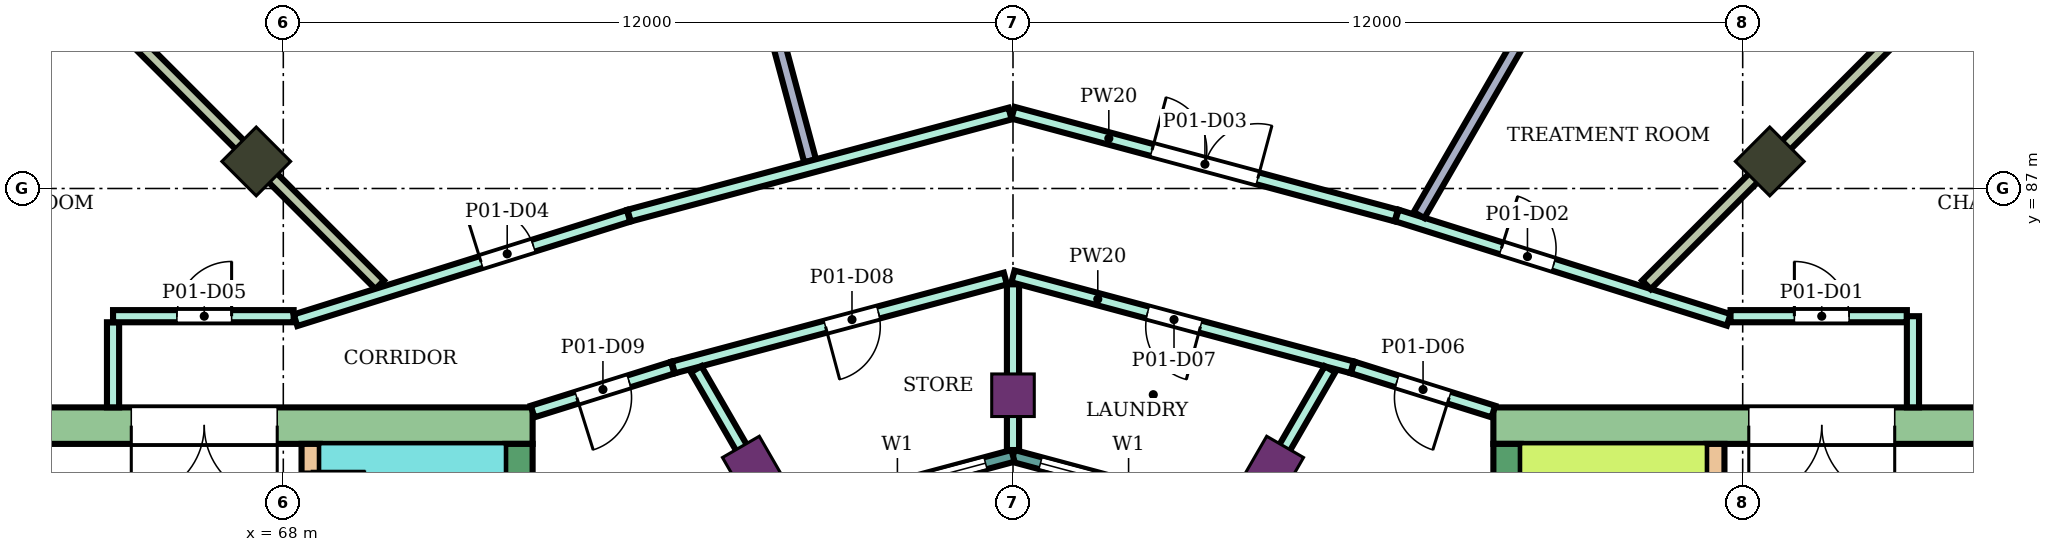
"""IFC4 building model, lengths in metres.
Left out: names, types, materials, properties, quantities, classifications, styles, units other than length and angle.
Written with IfcOpenShell. Run it as: python <this file> out.ifc"""

import sys

from ifc_helpers import new_model, si_unit, direction, frame, frame_2d, origin, origin_2d, place, context, subcontext, project, spatial, rectangle, extrude, element, fill, save


model = new_model("IFC4")
c1 = context("Model", 3, precision=1e-05, world=origin(), true_north=direction((0.0, 1.0)))
c2 = subcontext(c1, "Body", "Model", "MODEL_VIEW")
j1 = project(units=[si_unit("LENGTHUNIT", "METRE"), si_unit("PLANEANGLEUNIT", "RADIAN")], contexts=[c1])
p1 = place(None, origin())
s1 = spatial("IfcSite", under=j1, at=p1, CompositionType="ELEMENT")
p2 = place(p1, origin())
s2 = spatial("IfcBuilding", under=s1, at=p2, CompositionType="ELEMENT")
p3 = place(p2, frame((0.0, 0.0, 270.9)))
s3 = spatial("IfcBuildingStorey", under=s2, at=p3, CompositionType="ELEMENT", Elevation=270.9)
for number, where, z_axis, x_axis in (
    (1, (92.445, 87.445, 0.0), (0.0, 0.0, 1.0), (0.707, 0.707, 0.0)),
    (2, (67.555, 87.445, 0.0), (0.0, 0.0, 1.0), (-0.707, 0.707, 0.0)),
):
    element("IfcColumn", number, at=place(p3, frame(where, z_axis=z_axis, x_axis=x_axis)), inside=s3, PredefinedType="COLUMN", context=c2, shape_type="SweptSolid", body=[
        extrude(rectangle(XDim=0.8, YDim=0.8, at=origin_2d()), origin(), (0.0, 0.0, 1.0), 4.8),
    ])
for number, where, z_axis, x_axis in (
    (3, (84.3, 82.448, 0.0), (0.0, 0.0, 1.0), (0.5, 0.866, 0.0)),
    (4, (80.0, 83.6, 0.0), (0.0, 0.0, 1.0), (0.0, 1.0, 0.0)),
    (5, (75.7, 82.448, 0.0), (0.0, 0.0, 1.0), (-0.5, 0.866, 0.0)),
):
    element("IfcColumn", number, at=place(p3, frame(where, z_axis=z_axis, x_axis=x_axis)), inside=s3, PredefinedType="COLUMN", context=c2, shape_type="SweptSolid", body=[
        extrude(rectangle(XDim=0.7, YDim=0.7, at=origin_2d()), origin(), (0.0, 0.0, 1.0), 4.8),
    ])
p4 = place(p3, frame((87.9, 83.1, 0.0), z_axis=(0.0, 0.0, 1.0), x_axis=(1.0, 0.0, 0.0)))
e6 = element("IfcWall", 6, at=p4, inside=s3, PredefinedType="SHEAR", context=c2, shape_type="SweptSolid", body=[
    extrude(rectangle(XDim=14.9, YDim=0.6, at=frame_2d((7.45, 0.0))), origin(), (0.0, 0.0, 1.0), 4.48),
])
p5 = place(p4, frame((4.2, 0.0, 0.0)))
e7 = element("IfcOpeningElement", 7, at=p5, cuts=e6, PredefinedType="OPENING", context=c2, shape_type="SweptSolid", body=[
    extrude(rectangle(XDim=2.4, YDim=2.4, at=frame_2d((1.2, 1.2))), frame((0.0, 0.31, 0.0), z_axis=(0.0, -1.0, 0.0), x_axis=(1.0, 0.0, 0.0)), (0.0, 0.0, 1.0), 0.62),
])
p6 = place(p3, frame((88.125, 75.0, 0.0), z_axis=(0.0, 0.0, 1.0), x_axis=(0.0, 1.0, 0.0)))
e8 = element("IfcWall", 8, at=p6, inside=s3, PredefinedType="SHEAR", context=c2, shape_type="SweptSolid", body=[
    extrude(rectangle(XDim=7.8, YDim=0.45, at=frame_2d((3.9, 0.0))), origin(), (0.0, 0.0, 1.0), 4.48),
])
p7 = place(p3, frame((91.55, 75.0, 0.0), z_axis=(0.0, 0.0, 1.0), x_axis=(0.0, 1.0, 0.0)))
e9 = element("IfcWall", 9, at=p7, inside=s3, PredefinedType="SHEAR", context=c2, shape_type="SweptSolid", body=[
    extrude(rectangle(XDim=7.8, YDim=0.3, at=frame_2d((3.9, 0.0))), origin(), (0.0, 0.0, 1.0), 4.48),
])
p8 = place(p7, frame((1.85, 0.0, 0.0)))
e10 = element("IfcOpeningElement", 10, at=p8, cuts=e9, PredefinedType="OPENING", context=c2, shape_type="SweptSolid", body=[
    extrude(rectangle(XDim=0.9, YDim=2.1, at=frame_2d((0.45, 1.05))), frame((0.0, 0.16, 0.0), z_axis=(0.0, -1.0, 0.0), x_axis=(1.0, 0.0, 0.0)), (0.0, 0.0, 1.0), 0.32),
])
p9 = place(p3, frame((72.1, 83.1, 0.0), z_axis=(0.0, 0.0, 1.0), x_axis=(-1.0, 0.0, 0.0)))
e11 = element("IfcWall", 11, at=p9, inside=s3, PredefinedType="SHEAR", context=c2, shape_type="SweptSolid", body=[
    extrude(rectangle(XDim=14.9, YDim=0.6, at=frame_2d((7.45, 0.0))), origin(), (0.0, 0.0, 1.0), 4.48),
])
p10 = place(p9, frame((4.2, 0.0, 0.0)))
e12 = element("IfcOpeningElement", 12, at=p10, cuts=e11, PredefinedType="OPENING", context=c2, shape_type="SweptSolid", body=[
    extrude(rectangle(XDim=2.4, YDim=2.4, at=frame_2d((1.2, 1.2))), frame((0.0, 0.31, 0.0), z_axis=(0.0, -1.0, 0.0), x_axis=(1.0, 0.0, 0.0)), (0.0, 0.0, 1.0), 0.62),
])
p11 = place(p3, frame((71.875, 82.8, 0.0), z_axis=(0.0, 0.0, 1.0), x_axis=(0.0, -1.0, 0.0)))
e13 = element("IfcWall", 13, at=p11, inside=s3, PredefinedType="SHEAR", context=c2, shape_type="SweptSolid", body=[
    extrude(rectangle(XDim=7.8, YDim=0.45, at=frame_2d((3.9, 0.0))), origin(), (0.0, 0.0, 1.0), 4.48),
])
p12 = place(p3, frame((68.45, 82.8, 0.0), z_axis=(0.0, 0.0, 1.0), x_axis=(0.0, -1.0, 0.0)))
e14 = element("IfcWall", 14, at=p12, inside=s3, PredefinedType="SHEAR", context=c2, shape_type="SweptSolid", body=[
    extrude(rectangle(XDim=7.8, YDim=0.3, at=frame_2d((3.9, 0.0))), origin(), (0.0, 0.0, 1.0), 4.48),
])
p13 = place(p12, frame((0.45, 0.0, 0.0)))
e15 = element("IfcOpeningElement", 15, at=p13, cuts=e14, PredefinedType="OPENING", context=c2, shape_type="SweptSolid", body=[
    extrude(rectangle(XDim=0.9, YDim=2.1, at=frame_2d((0.45, 1.05))), frame((0.0, 0.16, 0.0), z_axis=(0.0, -1.0, 0.0), x_axis=(1.0, 0.0, 0.0)), (0.0, 0.0, 1.0), 0.32),
])
p14 = place(p3, frame((83.802, 81.585, 0.0), z_axis=(0.0, 0.0, 1.0), x_axis=(-0.965933654434, 0.258789828301, 0.0)))
e16 = element("IfcWall", 16, at=p14, inside=s3, PredefinedType="NOTDEFINED", context=c2, shape_type="SweptSolid", body=[
    extrude(rectangle(XDim=3.936, YDim=0.2, at=frame_2d((1.968, 0.0))), origin(), (0.0, 0.0, 1.0), 4.8),
])
p15 = place(p14, frame((0.468, 0.0, 0.9)))
e17 = element("IfcOpeningElement", 17, at=p15, cuts=e16, PredefinedType="OPENING", context=c2, shape_type="SweptSolid", body=[
    extrude(rectangle(XDim=3.0, YDim=2.3, at=frame_2d((1.5, 1.15))), frame((0.0, 0.11, 0.0), z_axis=(0.0, -1.0, 0.0), x_axis=(1.0, 0.0, 0.0)), (0.0, 0.0, 1.0), 0.22),
])
p16 = place(p3, frame((80.0, 82.604, 0.0), z_axis=(0.0, 0.0, 1.0), x_axis=(-0.965933654434, -0.258789828301, 0.0)))
e18 = element("IfcWall", 18, at=p16, inside=s3, PredefinedType="NOTDEFINED", context=c2, shape_type="SweptSolid", body=[
    extrude(rectangle(XDim=3.936, YDim=0.2, at=frame_2d((1.968, 0.0))), origin(), (0.0, 0.0, 1.0), 4.8),
])
p17 = place(p16, frame((0.468, 0.0, 0.9)))
e19 = element("IfcOpeningElement", 19, at=p17, cuts=e18, PredefinedType="OPENING", context=c2, shape_type="SweptSolid", body=[
    extrude(rectangle(XDim=3.0, YDim=2.3, at=frame_2d((1.5, 1.15))), frame((0.0, 0.11, 0.0), z_axis=(0.0, -1.0, 0.0), x_axis=(1.0, 0.0, 0.0)), (0.0, 0.0, 1.0), 0.22),
])
p18 = place(p3, frame((63.597, 91.406, 0.0), z_axis=(0.0, 0.0, 1.0), x_axis=(0.707034710536, -0.707178844492, 0.0)))
e20 = element("IfcWall", 20, at=p18, inside=s3, PredefinedType="PARTITIONING", context=c2, shape_type="SweptSolid", body=[
    extrude(rectangle(XDim=8.469, YDim=0.2, at=frame_2d((4.235, 0.0))), origin(), (0.0, 0.0, 1.0), 3.08),
])
p19 = place(p3, frame((65.2, 83.401, 0.0), z_axis=(0.0, 0.0, 1.0), x_axis=(0.0, 1.0, 0.0)))
e21 = element("IfcWall", 21, at=p19, inside=s3, PredefinedType="PARTITIONING", context=c2, shape_type="SweptSolid", body=[
    extrude(rectangle(XDim=1.399, YDim=0.2, at=frame_2d((0.7, 0.0))), origin(), (0.0, 0.0, 1.0), 4.35),
])
p20 = place(p3, frame((65.2, 84.9, 0.0), z_axis=(0.0, 0.0, 1.0), x_axis=(1.0, 0.0, 0.0)))
e22 = element("IfcWall", 22, at=p20, inside=s3, PredefinedType="PARTITIONING", context=c2, shape_type="SweptSolid", body=[
    extrude(rectangle(XDim=2.97, YDim=0.2, at=frame_2d((1.485, 0.0))), origin(), (0.0, 0.0, 1.0), 4.35),
])
p21 = place(p20, frame((1.05, 0.0, 0.0)))
e23 = element("IfcOpeningElement", 23, at=p21, cuts=e22, PredefinedType="OPENING", context=c2, shape_type="SweptSolid", body=[
    extrude(rectangle(XDim=0.9, YDim=2.1, at=frame_2d((0.45, 1.05))), frame((0.0, 0.11, 0.0), z_axis=(0.0, -1.0, 0.0), x_axis=(1.0, 0.0, 0.0)), (0.0, 0.0, 1.0), 0.22),
])
p22 = place(p3, frame((68.201, 84.833, 0.0), z_axis=(0.0, 0.0, 1.0), x_axis=(0.95420102455, 0.299166182492, 0.0)))
e24 = element("IfcWall", 24, at=p22, inside=s3, PredefinedType="PARTITIONING", context=c2, shape_type="SweptSolid", body=[
    extrude(rectangle(XDim=5.74, YDim=0.2, at=frame_2d((2.87, 0.0))), origin(), (0.0, 0.0, 1.0), 4.35),
])
p23 = place(p22, frame((3.198, 0.0, 0.0)))
e25 = element("IfcOpeningElement", 25, at=p23, cuts=e24, PredefinedType="OPENING", context=c2, shape_type="SweptSolid", body=[
    extrude(rectangle(XDim=0.9, YDim=2.1, at=frame_2d((0.45, 1.05))), frame((0.0, 0.11, 0.0), z_axis=(0.0, -1.0, 0.0), x_axis=(1.0, 0.0, 0.0)), (0.0, 0.0, 1.0), 0.22),
])
p24 = place(p3, frame((72.1, 83.332, 0.0), z_axis=(0.0, 0.0, 1.0), x_axis=(0.954233106619, 0.299063836383, 0.0)))
e26 = element("IfcWall", 26, at=p24, inside=s3, PredefinedType="PARTITIONING", context=c2, shape_type="SweptSolid", body=[
    extrude(rectangle(XDim=2.414, YDim=0.2, at=frame_2d((1.207, 0.0))), origin(), (0.0, 0.0, 1.0), 4.35),
])
p25 = place(p24, frame((0.762, 0.0, 0.0)))
e27 = element("IfcOpeningElement", 27, at=p25, cuts=e26, PredefinedType="OPENING", context=c2, shape_type="SweptSolid", body=[
    extrude(rectangle(XDim=0.9, YDim=2.1, at=frame_2d((0.45, 1.05))), frame((0.0, 0.11, 0.0), z_axis=(0.0, -1.0, 0.0), x_axis=(1.0, 0.0, 0.0)), (0.0, 0.0, 1.0), 0.22),
])
p26 = place(p3, frame((73.323, 99.918, 0.0), z_axis=(0.0, 0.0, 1.0), x_axis=(0.2588719653, -0.965911644811, 0.0)))
e28 = element("IfcWall", 28, at=p26, inside=s3, PredefinedType="PARTITIONING", context=c2, shape_type="SweptSolid", body=[
    extrude(rectangle(XDim=12.903, YDim=0.2, at=frame_2d((6.451, 0.0))), origin(), (0.0, 0.0, 1.0), 2.88),
])
p27 = place(p3, frame((73.687, 86.554, 0.0), z_axis=(0.0, 0.0, 1.0), x_axis=(0.965933770452, 0.258789395263, 0.0)))
e29 = element("IfcWall", 29, at=p27, inside=s3, PredefinedType="PARTITIONING", context=c2, shape_type="SweptSolid", body=[
    extrude(rectangle(XDim=6.486, YDim=0.2, at=frame_2d((3.243, 0.0))), origin(), (0.0, 0.0, 1.0), 4.35),
])
p28 = place(p3, frame((74.413, 84.057, 0.0), z_axis=(0.0, 0.0, 1.0), x_axis=(0.965972135939, 0.258646153246, 0.0)))
e30 = element("IfcWall", 30, at=p28, inside=s3, PredefinedType="PARTITIONING", context=c2, shape_type="SweptSolid", body=[
    extrude(rectangle(XDim=5.654, YDim=0.2, at=frame_2d((2.827, 0.0))), origin(), (0.0, 0.0, 1.0), 4.35),
])
p29 = place(p28, frame((2.593, 0.0, 0.0)))
e31 = element("IfcOpeningElement", 31, at=p29, cuts=e30, PredefinedType="OPENING", context=c2, shape_type="SweptSolid", body=[
    extrude(rectangle(XDim=0.9, YDim=2.1, at=frame_2d((0.45, 1.05))), frame((0.0, 0.11, 0.0), z_axis=(0.0, -1.0, 0.0), x_axis=(1.0, 0.0, 0.0)), (0.0, 0.0, 1.0), 0.22),
])
p30 = place(p3, frame((74.79, 84.028, 0.0), z_axis=(0.0, 0.0, 1.0), x_axis=(0.499905962189, -0.866079689733, 0.0)))
e32 = element("IfcWall", 32, at=p30, inside=s3, PredefinedType="PARTITIONING", context=c2, shape_type="SweptSolid", body=[
    extrude(rectangle(XDim=2.726, YDim=0.2, at=frame_2d((1.363, 0.0))), origin(), (0.0, 0.0, 1.0), 4.35),
])
p31 = place(p3, frame((80.0, 82.699, 0.0), z_axis=(0.0, 0.0, 1.0), x_axis=(0.0, 1.0, 0.0)))
e33 = element("IfcWall", 33, at=p31, inside=s3, PredefinedType="PARTITIONING", context=c2, shape_type="SweptSolid", body=[
    extrude(rectangle(XDim=2.725, YDim=0.2, at=frame_2d((1.363, 0.0))), origin(), (0.0, 0.0, 1.0), 4.35),
])
p32 = place(p3, frame((80.0, 85.554, 0.0), z_axis=(0.0, 0.0, 1.0), x_axis=(0.965928989968, -0.258807237802, 0.0)))
e34 = element("IfcWall", 34, at=p32, inside=s3, PredefinedType="PARTITIONING", context=c2, shape_type="SweptSolid", body=[
    extrude(rectangle(XDim=5.774, YDim=0.2, at=frame_2d((2.887, 0.0))), origin(), (0.0, 0.0, 1.0), 4.35),
])
p33 = place(p32, frame((2.292, 0.0, 0.0)))
e35 = element("IfcOpeningElement", 35, at=p33, cuts=e34, PredefinedType="OPENING", context=c2, shape_type="SweptSolid", body=[
    extrude(rectangle(XDim=0.9, YDim=2.1, at=frame_2d((0.45, 1.05))), frame((0.0, 0.11, 0.0), z_axis=(0.0, -1.0, 0.0), x_axis=(1.0, 0.0, 0.0)), (0.0, 0.0, 1.0), 0.22),
])
p34 = place(p3, frame((80.0, 88.246, 0.0), z_axis=(0.0, 0.0, 1.0), x_axis=(0.965856994925, -0.259075790752, 0.0)))
e36 = element("IfcWall", 36, at=p34, inside=s3, PredefinedType="PARTITIONING", context=c2, shape_type="SweptSolid", body=[
    extrude(rectangle(XDim=6.526, YDim=0.2, at=frame_2d((3.263, 0.0))), origin(), (0.0, 0.0, 1.0), 4.35),
])
p35 = place(p34, frame((2.368, 0.0, 0.0)))
e37 = element("IfcOpeningElement", 37, at=p35, cuts=e36, PredefinedType="OPENING", context=c2, shape_type="SweptSolid", body=[
    extrude(rectangle(XDim=1.8, YDim=2.1, at=frame_2d((0.9, 1.05))), frame((0.0, 0.11, 0.0), z_axis=(0.0, -1.0, 0.0), x_axis=(1.0, 0.0, 0.0)), (0.0, 0.0, 1.0), 0.22),
])
p36 = place(p3, frame((83.85, 81.667, 0.0), z_axis=(0.0, 0.0, 1.0), x_axis=(0.500079107518, 0.86597972622, 0.0)))
e38 = element("IfcWall", 38, at=p36, inside=s3, PredefinedType="PARTITIONING", context=c2, shape_type="SweptSolid", body=[
    extrude(rectangle(XDim=2.726, YDim=0.2, at=frame_2d((1.363, 0.0))), origin(), (0.0, 0.0, 1.0), 4.35),
])
p37 = place(p3, frame((85.587, 84.057, 0.0), z_axis=(0.0, 0.0, 1.0), x_axis=(0.954239513179, -0.299043393987, 0.0)))
e39 = element("IfcWall", 39, at=p37, inside=s3, PredefinedType="PARTITIONING", context=c2, shape_type="SweptSolid", body=[
    extrude(rectangle(XDim=2.424, YDim=0.2, at=frame_2d((1.212, 0.0))), origin(), (0.0, 0.0, 1.0), 4.35),
])
p38 = place(p37, frame((0.762, 0.0, 0.0)))
e40 = element("IfcOpeningElement", 40, at=p38, cuts=e39, PredefinedType="OPENING", context=c2, shape_type="SweptSolid", body=[
    extrude(rectangle(XDim=0.9, YDim=2.1, at=frame_2d((0.45, 1.05))), frame((0.0, 0.11, 0.0), z_axis=(0.0, -1.0, 0.0), x_axis=(1.0, 0.0, 0.0)), (0.0, 0.0, 1.0), 0.22),
])
p39 = place(p3, frame((86.314, 86.556, 0.0), z_axis=(0.0, 0.0, 1.0), x_axis=(0.953912400139, -0.300085209334, 0.0)))
e41 = element("IfcWall", 41, at=p39, inside=s3, PredefinedType="PARTITIONING", context=c2, shape_type="SweptSolid", body=[
    extrude(rectangle(XDim=5.719, YDim=0.2, at=frame_2d((2.86, 0.0))), origin(), (0.0, 0.0, 1.0), 4.35),
])
p40 = place(p39, frame((1.801, 0.0, 0.0)))
e42 = element("IfcOpeningElement", 42, at=p40, cuts=e41, PredefinedType="OPENING", context=c2, shape_type="SweptSolid", body=[
    extrude(rectangle(XDim=0.9, YDim=2.1, at=frame_2d((0.45, 1.05))), frame((0.0, 0.11, 0.0), z_axis=(0.0, -1.0, 0.0), x_axis=(1.0, 0.0, 0.0)), (0.0, 0.0, 1.0), 0.22),
])
p41 = place(p3, frame((86.677, 86.563, 0.0), z_axis=(0.0, 0.0, 1.0), x_axis=(0.500143584568, 0.865942489324, 0.0)))
e43 = element("IfcWall", 43, at=p41, inside=s3, PredefinedType="PARTITIONING", context=c2, shape_type="SweptSolid", body=[
    extrude(rectangle(XDim=12.445, YDim=0.2, at=frame_2d((6.222, 0.0))), origin(), (0.0, 0.0, 1.0), 2.88),
])
p42 = place(p3, frame((90.417, 85.415, 0.0), z_axis=(0.0, 0.0, 1.0), x_axis=(0.707164431244, 0.707049126429, 0.0)))
e44 = element("IfcWall", 44, at=p42, inside=s3, PredefinedType="PARTITIONING", context=c2, shape_type="SweptSolid", body=[
    extrude(rectangle(XDim=8.469, YDim=0.2, at=frame_2d((4.235, 0.0))), origin(), (0.0, 0.0, 1.0), 3.08),
])
p43 = place(p3, frame((91.8, 84.9, 0.0), z_axis=(0.0, 0.0, 1.0), x_axis=(1.0, 0.0, 0.0)))
e45 = element("IfcWall", 45, at=p43, inside=s3, PredefinedType="PARTITIONING", context=c2, shape_type="SweptSolid", body=[
    extrude(rectangle(XDim=2.9, YDim=0.2, at=frame_2d((1.45, 0.0))), origin(), (0.0, 0.0, 1.0), 4.35),
])
p44 = place(p43, frame((1.05, 0.0, 0.0)))
e46 = element("IfcOpeningElement", 46, at=p44, cuts=e45, PredefinedType="OPENING", context=c2, shape_type="SweptSolid", body=[
    extrude(rectangle(XDim=0.9, YDim=2.1, at=frame_2d((0.45, 1.05))), frame((0.0, 0.11, 0.0), z_axis=(0.0, -1.0, 0.0), x_axis=(1.0, 0.0, 0.0)), (0.0, 0.0, 1.0), 0.22),
])
p45 = place(p3, frame((94.8, 83.401, 0.0), z_axis=(0.0, 0.0, 1.0), x_axis=(0.0, 1.0, 0.0)))
e47 = element("IfcWall", 47, at=p45, inside=s3, PredefinedType="PARTITIONING", context=c2, shape_type="SweptSolid", body=[
    extrude(rectangle(XDim=1.499, YDim=0.2, at=frame_2d((0.75, 0.0))), origin(), (0.0, 0.0, 1.0), 4.35),
])
p46 = place(p15, origin())
e48 = element("IfcWindow", 48, at=p46, inside=s3, PartitioningType="SINGLE_PANEL", PredefinedType="WINDOW", context=c2, shape_type="SweptSolid", body=[
    extrude(rectangle(XDim=3.0, YDim=2.3, at=frame_2d((1.5, 1.15))), frame((0.0, 0.03, 0.0), z_axis=(0.0, -1.0, 0.0), x_axis=(1.0, 0.0, 0.0)), (0.0, 0.0, 1.0), 0.06),
])
fill(e17, e48)
p47 = place(p17, origin())
e49 = element("IfcWindow", 49, at=p47, inside=s3, PartitioningType="SINGLE_PANEL", PredefinedType="WINDOW", context=c2, shape_type="SweptSolid", body=[
    extrude(rectangle(XDim=3.0, YDim=2.3, at=frame_2d((1.5, 1.15))), frame((0.0, 0.03, 0.0), z_axis=(0.0, -1.0, 0.0), x_axis=(1.0, 0.0, 0.0)), (0.0, 0.0, 1.0), 0.06),
])
fill(e19, e49)
p48 = place(p44, origin())
e50 = element("IfcDoor", 50, at=p48, inside=s3, OperationType="SINGLE_SWING_LEFT", PredefinedType="DOOR", context=c2, shape_type="SweptSolid", body=[
    extrude(rectangle(XDim=0.9, YDim=2.1, at=frame_2d((0.45, 1.05))), frame((0.0, 0.025, 0.0), z_axis=(0.0, -1.0, 0.0), x_axis=(1.0, 0.0, 0.0)), (0.0, 0.0, 1.0), 0.05),
])
fill(e46, e50)
p49 = place(p40, origin())
e51 = element("IfcDoor", 51, at=p49, inside=s3, OperationType="SINGLE_SWING_LEFT", PredefinedType="DOOR", context=c2, shape_type="SweptSolid", body=[
    extrude(rectangle(XDim=0.9, YDim=2.1, at=frame_2d((0.45, 1.05))), frame((0.0, 0.025, 0.0), z_axis=(0.0, -1.0, 0.0), x_axis=(1.0, 0.0, 0.0)), (0.0, 0.0, 1.0), 0.05),
])
fill(e42, e51)
p50 = place(p35, origin())
e52 = element("IfcDoor", 52, at=p50, inside=s3, OperationType="DOUBLE_DOOR_SINGLE_SWING", PredefinedType="DOOR", context=c2, shape_type="SweptSolid", body=[
    extrude(rectangle(XDim=1.8, YDim=2.1, at=frame_2d((0.9, 1.05))), frame((0.0, 0.025, 0.0), z_axis=(0.0, -1.0, 0.0), x_axis=(1.0, 0.0, 0.0)), (0.0, 0.0, 1.0), 0.05),
])
fill(e37, e52)
p51 = place(p23, origin())
e53 = element("IfcDoor", 53, at=p51, inside=s3, OperationType="SINGLE_SWING_LEFT", PredefinedType="DOOR", context=c2, shape_type="SweptSolid", body=[
    extrude(rectangle(XDim=0.9, YDim=2.1, at=frame_2d((0.45, 1.05))), frame((0.0, 0.025, 0.0), z_axis=(0.0, -1.0, 0.0), x_axis=(1.0, 0.0, 0.0)), (0.0, 0.0, 1.0), 0.05),
])
fill(e25, e53)
p52 = place(p21, origin())
e54 = element("IfcDoor", 54, at=p52, inside=s3, OperationType="SINGLE_SWING_RIGHT", PredefinedType="DOOR", context=c2, shape_type="SweptSolid", body=[
    extrude(rectangle(XDim=0.9, YDim=2.1, at=frame_2d((0.45, 1.05))), frame((0.0, 0.025, 0.0), z_axis=(0.0, -1.0, 0.0), x_axis=(1.0, 0.0, 0.0)), (0.0, 0.0, 1.0), 0.05),
])
fill(e23, e54)
p53 = place(p38, frame((0.9, 0.0, 0.0), z_axis=(0.0, 0.0, 1.0), x_axis=(-1.0, 0.0, 0.0)))
e55 = element("IfcDoor", 55, at=p53, inside=s3, OperationType="SINGLE_SWING_LEFT", PredefinedType="DOOR", context=c2, shape_type="SweptSolid", body=[
    extrude(rectangle(XDim=0.9, YDim=2.1, at=frame_2d((0.45, 1.05))), frame((0.0, 0.025, 0.0), z_axis=(0.0, -1.0, 0.0), x_axis=(1.0, 0.0, 0.0)), (0.0, 0.0, 1.0), 0.05),
])
fill(e40, e55)
p54 = place(p33, frame((0.9, 0.0, 0.0), z_axis=(0.0, 0.0, 1.0), x_axis=(-1.0, 0.0, 0.0)))
e56 = element("IfcDoor", 56, at=p54, inside=s3, OperationType="SINGLE_SWING_LEFT", PredefinedType="DOOR", context=c2, shape_type="SweptSolid", body=[
    extrude(rectangle(XDim=0.9, YDim=2.1, at=frame_2d((0.45, 1.05))), frame((0.0, 0.025, 0.0), z_axis=(0.0, -1.0, 0.0), x_axis=(1.0, 0.0, 0.0)), (0.0, 0.0, 1.0), 0.05),
])
fill(e35, e56)
p55 = place(p29, frame((0.9, 0.0, 0.0), z_axis=(0.0, 0.0, 1.0), x_axis=(-1.0, 0.0, 0.0)))
e57 = element("IfcDoor", 57, at=p55, inside=s3, OperationType="SINGLE_SWING_RIGHT", PredefinedType="DOOR", context=c2, shape_type="SweptSolid", body=[
    extrude(rectangle(XDim=0.9, YDim=2.1, at=frame_2d((0.45, 1.05))), frame((0.0, 0.025, 0.0), z_axis=(0.0, -1.0, 0.0), x_axis=(1.0, 0.0, 0.0)), (0.0, 0.0, 1.0), 0.05),
])
fill(e31, e57)
p56 = place(p25, frame((0.9, 0.0, 0.0), z_axis=(0.0, 0.0, 1.0), x_axis=(-1.0, 0.0, 0.0)))
e58 = element("IfcDoor", 58, at=p56, inside=s3, OperationType="SINGLE_SWING_RIGHT", PredefinedType="DOOR", context=c2, shape_type="SweptSolid", body=[
    extrude(rectangle(XDim=0.9, YDim=2.1, at=frame_2d((0.45, 1.05))), frame((0.0, 0.025, 0.0), z_axis=(0.0, -1.0, 0.0), x_axis=(1.0, 0.0, 0.0)), (0.0, 0.0, 1.0), 0.05),
])
fill(e27, e58)
p57 = place(p5, frame((2.4, 0.0, 0.0), z_axis=(0.0, 0.0, 1.0), x_axis=(-1.0, 0.0, 0.0)))
e59 = element("IfcDoor", 59, at=p57, inside=s3, OperationType="DOUBLE_DOOR_SINGLE_SWING", PredefinedType="DOOR", context=c2, shape_type="SweptSolid", body=[
    extrude(rectangle(XDim=2.4, YDim=2.4, at=frame_2d((1.2, 1.2))), frame((0.0, 0.025, 0.0), z_axis=(0.0, -1.0, 0.0), x_axis=(1.0, 0.0, 0.0)), (0.0, 0.0, 1.0), 0.05),
])
fill(e7, e59)
p58 = place(p13, origin())
e60 = element("IfcDoor", 60, at=p58, inside=s3, OperationType="SINGLE_SWING_LEFT", PredefinedType="DOOR", context=c2, shape_type="SweptSolid", body=[
    extrude(rectangle(XDim=0.9, YDim=2.1, at=frame_2d((0.45, 1.05))), frame((0.0, 0.025, 0.0), z_axis=(0.0, -1.0, 0.0), x_axis=(1.0, 0.0, 0.0)), (0.0, 0.0, 1.0), 0.05),
])
fill(e15, e60)
p59 = place(p10, origin())
e61 = element("IfcDoor", 61, at=p59, inside=s3, OperationType="DOUBLE_DOOR_SINGLE_SWING", PredefinedType="DOOR", context=c2, shape_type="SweptSolid", body=[
    extrude(rectangle(XDim=2.4, YDim=2.4, at=frame_2d((1.2, 1.2))), frame((0.0, 0.025, 0.0), z_axis=(0.0, -1.0, 0.0), x_axis=(1.0, 0.0, 0.0)), (0.0, 0.0, 1.0), 0.05),
])
fill(e12, e61)
save(model, sys.argv[1])
